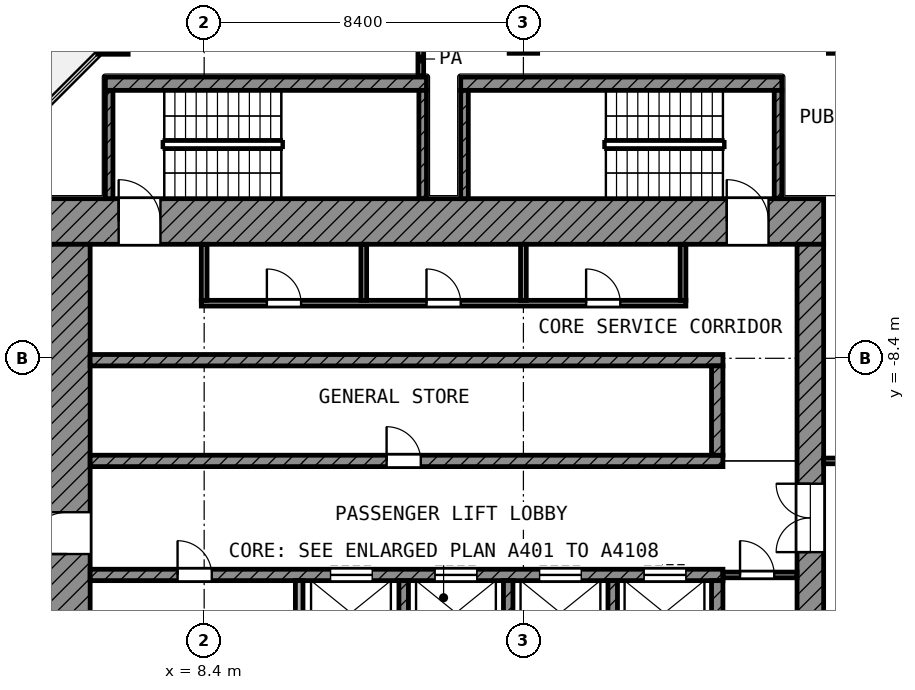
"""IFC4 building model, lengths in metres.
Left out: names, types, materials, properties, quantities, classifications, styles, units other than length and angle.
Written with IfcOpenShell. Run it as: python <this file> out.ifc"""

import sys

from ifc_helpers import new_model, si_unit, direction, frame, frame_2d, origin, origin_2d, place, context, subcontext, project, spatial, rectangle, extrude, element, fill, save


model = new_model("IFC4")
c1 = context("Model", 3, precision=1e-05, world=origin(), true_north=direction((0.0, 1.0)))
c2 = subcontext(c1, "Body", "Model", "MODEL_VIEW")
j1 = project(units=[si_unit("LENGTHUNIT", "METRE"), si_unit("PLANEANGLEUNIT", "RADIAN")], contexts=[c1])
p1 = place(None, origin())
s1 = spatial("IfcSite", under=j1, at=p1, CompositionType="ELEMENT")
p2 = place(p1, origin())
s2 = spatial("IfcBuilding", under=s1, at=p2, CompositionType="ELEMENT")
p3 = place(p2, frame((0.0, 0.0, 315.4)))
s3 = spatial("IfcBuildingStorey", under=s2, at=p3, CompositionType="ELEMENT", Elevation=315.4)
p4 = place(p3, frame((6.0, 0.0, 0.0), z_axis=(0.0, 0.0, 1.0), x_axis=(1.0, 0.0, 0.0)))
e1 = element("IfcColumn", 1, at=p4, inside=s3, PredefinedType="COLUMN", context=c2, shape_type="SweptSolid", body=[
    extrude(rectangle(XDim=0.8, YDim=0.8, at=origin_2d()), origin(), (0.0, 0.0, 1.0), 4.2),
])
for number, where, z_axis, x_axis in (
    (2, (16.8, 0.0, 0.0), (0.0, 0.0, 1.0), (1.0, 0.0, 0.0)),
    (3, (25.2, 0.0, 0.0), (0.0, 0.0, 1.0), (1.0, 0.0, 0.0)),
):
    element("IfcColumn", number, at=place(p3, frame(where, z_axis=z_axis, x_axis=x_axis)), inside=s3, PredefinedType="COLUMN", context=c2, shape_type="SweptSolid", body=[
        extrude(rectangle(XDim=0.75, YDim=0.75, at=origin_2d()), origin(), (0.0, 0.0, 1.0), 4.2),
    ])
p5 = place(p3, frame((4.2, -4.8, 0.0), z_axis=(0.0, 0.0, 1.0), x_axis=(1.0, 0.0, 0.0)))
e4 = element("IfcWall", 4, at=p5, inside=s3, PredefinedType="SHEAR", context=c2, shape_type="SweptSolid", body=[
    extrude(rectangle(XDim=20.5, YDim=1.2, at=frame_2d((10.25, 0.0))), origin(), (0.0, 0.0, 1.0), 3.6),
])
p6 = place(p5, frame((1.95, 0.0, 0.0)))
e5 = element("IfcOpeningElement", 5, at=p6, cuts=e4, PredefinedType="OPENING", context=c2, shape_type="SweptSolid", body=[
    extrude(rectangle(XDim=1.1, YDim=2.1, at=frame_2d((0.55, 1.05))), frame((0.0, 0.61, 0.0), z_axis=(0.0, -1.0, 0.0), x_axis=(1.0, 0.0, 0.0)), (0.0, 0.0, 1.0), 1.22),
])
p7 = place(p5, frame((17.95, 0.0, 0.0)))
e6 = element("IfcOpeningElement", 6, at=p7, cuts=e4, PredefinedType="OPENING", context=c2, shape_type="SweptSolid", body=[
    extrude(rectangle(XDim=1.1, YDim=2.1, at=frame_2d((0.55, 1.05))), frame((0.0, 0.61, 0.0), z_axis=(0.0, -1.0, 0.0), x_axis=(1.0, 0.0, 0.0)), (0.0, 0.0, 1.0), 1.22),
])
p8 = place(p3, frame((4.8, -24.7, 0.0), z_axis=(0.0, 0.0, 1.0), x_axis=(0.0, 1.0, 0.0)))
e7 = element("IfcWall", 7, at=p8, inside=s3, PredefinedType="SHEAR", context=c2, shape_type="SweptSolid", body=[
    extrude(rectangle(XDim=19.3, YDim=1.2, at=frame_2d((9.65, 0.0))), origin(), (0.0, 0.0, 1.0), 3.6),
])
p9 = place(p8, frame((11.15, 0.0, 0.0)))
e8 = element("IfcOpeningElement", 8, at=p9, cuts=e7, PredefinedType="OPENING", context=c2, shape_type="SweptSolid", body=[
    extrude(rectangle(XDim=1.1, YDim=2.1, at=frame_2d((0.55, 1.05))), frame((0.0, 0.61, 0.0), z_axis=(0.0, -1.0, 0.0), x_axis=(1.0, 0.0, 0.0)), (0.0, 0.0, 1.0), 1.22),
])
p10 = place(p8, frame((1.85, 0.0, 0.0)))
e9 = element("IfcOpeningElement", 9, at=p10, cuts=e7, PredefinedType="OPENING", context=c2, shape_type="SweptSolid", body=[
    extrude(rectangle(XDim=1.1, YDim=2.1, at=frame_2d((0.55, 1.05))), frame((0.0, 0.61, 0.0), z_axis=(0.0, -1.0, 0.0), x_axis=(1.0, 0.0, 0.0)), (0.0, 0.0, 1.0), 1.22),
])
p11 = place(p3, frame((24.35, -24.0, 0.0), z_axis=(0.0, 0.0, 1.0), x_axis=(0.0, 1.0, 0.0)))
e10 = element("IfcWall", 10, at=p11, inside=s3, PredefinedType="SHEAR", context=c2, shape_type="SweptSolid", body=[
    extrude(rectangle(XDim=18.6, YDim=0.7, at=frame_2d((9.3, 0.0))), origin(), (0.0, 0.0, 1.0), 3.6),
])
p12 = place(p11, frame((10.5, 0.0, 0.0)))
e11 = element("IfcOpeningElement", 11, at=p12, cuts=e10, PredefinedType="OPENING", context=c2, shape_type="SweptSolid", body=[
    extrude(rectangle(XDim=1.8, YDim=2.1, at=frame_2d((0.9, 1.05))), frame((0.0, 0.36, 0.0), z_axis=(0.0, -1.0, 0.0), x_axis=(1.0, 0.0, 0.0)), (0.0, 0.0, 1.0), 0.72),
])
p13 = place(p3, frame((5.4, -8.45, 0.0), z_axis=(0.0, 0.0, 1.0), x_axis=(1.0, 0.0, 0.0)))
e12 = element("IfcWall", 12, at=p13, inside=s3, PredefinedType="SHEAR", context=c2, shape_type="SweptSolid", body=[
    extrude(rectangle(XDim=16.65, YDim=0.3, at=frame_2d((8.325, 0.0))), origin(), (0.0, 0.0, 1.0), 3.6),
])
p14 = place(p3, frame((5.4, -11.1, 0.0), z_axis=(0.0, 0.0, 1.0), x_axis=(1.0, 0.0, 0.0)))
e13 = element("IfcWall", 13, at=p14, inside=s3, PredefinedType="SHEAR", context=c2, shape_type="SweptSolid", body=[
    extrude(rectangle(XDim=16.65, YDim=0.3, at=frame_2d((8.325, 0.0))), origin(), (0.0, 0.0, 1.0), 3.6),
])
p15 = place(p14, frame((7.8, 0.0, 0.0)))
e14 = element("IfcOpeningElement", 14, at=p15, cuts=e13, PredefinedType="OPENING", context=c2, shape_type="SweptSolid", body=[
    extrude(rectangle(XDim=0.9, YDim=2.1, at=frame_2d((0.45, 1.05))), frame((0.0, 0.16, 0.0), z_axis=(0.0, -1.0, 0.0), x_axis=(1.0, 0.0, 0.0)), (0.0, 0.0, 1.0), 0.32),
])
p16 = place(p3, frame((5.4, -14.1, 0.0), z_axis=(0.0, 0.0, 1.0), x_axis=(1.0, 0.0, 0.0)))
e15 = element("IfcWall", 15, at=p16, inside=s3, PredefinedType="SHEAR", context=c2, shape_type="SweptSolid", body=[
    extrude(rectangle(XDim=16.65, YDim=0.3, at=frame_2d((8.325, 0.0))), origin(), (0.0, 0.0, 1.0), 3.6),
])
p17 = place(p16, frame((6.325, 0.0, 0.0)))
e16 = element("IfcOpeningElement", 16, at=p17, cuts=e15, PredefinedType="OPENING", context=c2, shape_type="SweptSolid", body=[
    extrude(rectangle(XDim=1.1, YDim=2.1, at=frame_2d((0.55, 1.05))), frame((0.0, 0.16, 0.0), z_axis=(0.0, -1.0, 0.0), x_axis=(1.0, 0.0, 0.0)), (0.0, 0.0, 1.0), 0.32),
])
p18 = place(p16, frame((9.075, 0.0, 0.0)))
e17 = element("IfcOpeningElement", 17, at=p18, cuts=e15, PredefinedType="OPENING", context=c2, shape_type="SweptSolid", body=[
    extrude(rectangle(XDim=1.1, YDim=2.1, at=frame_2d((0.55, 1.05))), frame((0.0, 0.16, 0.0), z_axis=(0.0, -1.0, 0.0), x_axis=(1.0, 0.0, 0.0)), (0.0, 0.0, 1.0), 0.32),
])
p19 = place(p16, frame((11.825, 0.0, 0.0)))
e18 = element("IfcOpeningElement", 18, at=p19, cuts=e15, PredefinedType="OPENING", context=c2, shape_type="SweptSolid", body=[
    extrude(rectangle(XDim=1.1, YDim=2.1, at=frame_2d((0.55, 1.05))), frame((0.0, 0.16, 0.0), z_axis=(0.0, -1.0, 0.0), x_axis=(1.0, 0.0, 0.0)), (0.0, 0.0, 1.0), 0.32),
])
p20 = place(p16, frame((14.575, 0.0, 0.0)))
e19 = element("IfcOpeningElement", 19, at=p20, cuts=e15, PredefinedType="OPENING", context=c2, shape_type="SweptSolid", body=[
    extrude(rectangle(XDim=1.1, YDim=2.1, at=frame_2d((0.55, 1.05))), frame((0.0, 0.16, 0.0), z_axis=(0.0, -1.0, 0.0), x_axis=(1.0, 0.0, 0.0)), (0.0, 0.0, 1.0), 0.32),
])
p21 = place(p16, frame((2.3, 0.0, 0.0)))
e20 = element("IfcOpeningElement", 20, at=p21, cuts=e15, PredefinedType="OPENING", context=c2, shape_type="SweptSolid", body=[
    extrude(rectangle(XDim=0.9, YDim=2.1, at=frame_2d((0.45, 1.05))), frame((0.0, 0.16, 0.0), z_axis=(0.0, -1.0, 0.0), x_axis=(1.0, 0.0, 0.0)), (0.0, 0.0, 1.0), 0.32),
])
p22 = place(p3, frame((21.9, -10.95, 0.0), z_axis=(0.0, 0.0, 1.0), x_axis=(0.0, 1.0, 0.0)))
e21 = element("IfcWall", 21, at=p22, inside=s3, PredefinedType="SHEAR", context=c2, shape_type="SweptSolid", body=[
    extrude(rectangle(XDim=2.35, YDim=0.3, at=frame_2d((1.175, 0.0))), origin(), (0.0, 0.0, 1.0), 3.6),
])
p23 = place(p3, frame((21.9, -16.6, 0.0), z_axis=(0.0, 0.0, 1.0), x_axis=(0.0, 1.0, 0.0)))
e22 = element("IfcWall", 22, at=p23, inside=s3, PredefinedType="SHEAR", context=c2, shape_type="SweptSolid", body=[
    extrude(rectangle(XDim=2.35, YDim=0.3, at=frame_2d((1.175, 0.0))), origin(), (0.0, 0.0, 1.0), 3.6),
])
p24 = place(p3, frame((10.9, -16.6, 0.0), z_axis=(0.0, 0.0, 1.0), x_axis=(0.0, 1.0, 0.0)))
e23 = element("IfcWall", 23, at=p24, inside=s3, PredefinedType="PARTITIONING", context=c2, shape_type="SweptSolid", body=[
    extrude(rectangle(XDim=2.35, YDim=0.2, at=frame_2d((1.175, 0.0))), origin(), (0.0, 0.0, 1.0), 3.6),
])
for number, where, z_axis, x_axis in (
    (24, (13.65, -16.6, 0.0), (0.0, 0.0, 1.0), (0.0, 1.0, 0.0)),
    (25, (16.4, -16.6, 0.0), (0.0, 0.0, 1.0), (0.0, 1.0, 0.0)),
    (26, (19.15, -16.6, 0.0), (0.0, 0.0, 1.0), (0.0, 1.0, 0.0)),
):
    element("IfcWall", number, at=place(p3, frame(where, z_axis=z_axis, x_axis=x_axis)), inside=s3, PredefinedType="SHEAR", context=c2, shape_type="SweptSolid", body=[
        extrude(rectangle(XDim=2.35, YDim=0.25, at=frame_2d((1.175, 0.0))), origin(), (0.0, 0.0, 1.0), 3.6),
    ])
p25 = place(p3, frame((22.05, -14.1, 0.0), z_axis=(0.0, 0.0, 1.0), x_axis=(1.0, 0.0, 0.0)))
e27 = element("IfcWall", 27, at=p25, inside=s3, PredefinedType="PARTITIONING", context=c2, shape_type="SweptSolid", body=[
    extrude(rectangle(XDim=1.95, YDim=0.15, at=frame_2d((0.975, 0.0))), origin(), (0.0, 0.0, 1.0), 3.6),
])
p26 = place(p25, frame((0.45, 0.0, 0.0)))
e28 = element("IfcOpeningElement", 28, at=p26, cuts=e27, PredefinedType="OPENING", context=c2, shape_type="SweptSolid", body=[
    extrude(rectangle(XDim=0.9, YDim=2.1, at=frame_2d((0.45, 1.05))), frame((0.0, 0.085, 0.0), z_axis=(0.0, -1.0, 0.0), x_axis=(1.0, 0.0, 0.0)), (0.0, 0.0, 1.0), 0.17),
])
p27 = place(p3, frame((8.325, -6.95, 0.0), z_axis=(0.0, 0.0, 1.0), x_axis=(1.0, 0.0, 0.0)))
e29 = element("IfcWall", 29, at=p27, inside=s3, PredefinedType="PARTITIONING", context=c2, shape_type="SweptSolid", body=[
    extrude(rectangle(XDim=12.75, YDim=0.15, at=frame_2d((6.375, 0.0))), origin(), (0.0, 0.0, 1.0), 3.6),
])
p28 = place(p27, frame((1.725, 0.0, 0.0)))
e30 = element("IfcOpeningElement", 30, at=p28, cuts=e29, PredefinedType="OPENING", context=c2, shape_type="SweptSolid", body=[
    extrude(rectangle(XDim=0.9, YDim=2.1, at=frame_2d((0.45, 1.05))), frame((0.0, 0.085, 0.0), z_axis=(0.0, -1.0, 0.0), x_axis=(1.0, 0.0, 0.0)), (0.0, 0.0, 1.0), 0.17),
])
p29 = place(p27, frame((5.925, 0.0, 0.0)))
e31 = element("IfcOpeningElement", 31, at=p29, cuts=e29, PredefinedType="OPENING", context=c2, shape_type="SweptSolid", body=[
    extrude(rectangle(XDim=0.9, YDim=2.1, at=frame_2d((0.45, 1.05))), frame((0.0, 0.085, 0.0), z_axis=(0.0, -1.0, 0.0), x_axis=(1.0, 0.0, 0.0)), (0.0, 0.0, 1.0), 0.17),
])
p30 = place(p27, frame((10.125, 0.0, 0.0)))
e32 = element("IfcOpeningElement", 32, at=p30, cuts=e29, PredefinedType="OPENING", context=c2, shape_type="SweptSolid", body=[
    extrude(rectangle(XDim=0.9, YDim=2.1, at=frame_2d((0.45, 1.05))), frame((0.0, 0.085, 0.0), z_axis=(0.0, -1.0, 0.0), x_axis=(1.0, 0.0, 0.0)), (0.0, 0.0, 1.0), 0.17),
])
for number, where, z_axis, x_axis in (
    (33, (8.4, -6.875, 0.0), (0.0, 0.0, 1.0), (0.0, 1.0, 0.0)),
    (34, (12.6, -6.875, 0.0), (0.0, 0.0, 1.0), (0.0, 1.0, 0.0)),
    (35, (16.8, -6.875, 0.0), (0.0, 0.0, 1.0), (0.0, 1.0, 0.0)),
    (36, (21.0, -6.875, 0.0), (0.0, 0.0, 1.0), (0.0, 1.0, 0.0)),
):
    element("IfcWall", number, at=place(p3, frame(where, z_axis=z_axis, x_axis=x_axis)), inside=s3, PredefinedType="PARTITIONING", context=c2, shape_type="SweptSolid", body=[
        extrude(rectangle(XDim=1.475, YDim=0.15, at=frame_2d((0.738, 0.0))), origin(), (0.0, 0.0, 1.0), 3.6),
    ])
p31 = place(p3, frame((5.8, -1.175, 0.0), z_axis=(0.0, 0.0, 1.0), x_axis=(1.0, 0.0, 0.0)))
e37 = element("IfcWall", 37, at=p31, inside=s3, PredefinedType="SHEAR", context=c2, shape_type="SweptSolid", body=[
    extrude(rectangle(XDim=8.45, YDim=0.35, at=frame_2d((4.225, 0.0))), origin(), (0.0, 0.0, 1.0), 3.6),
])
for number, where, z_axis, x_axis in (
    (38, (5.9, -4.2, 0.0), (0.0, 0.0, 1.0), (0.0, 1.0, 0.0)),
    (39, (14.15, -4.2, 0.0), (0.0, 0.0, 1.0), (0.0, 1.0, 0.0)),
):
    element("IfcWall", number, at=place(p3, frame(where, z_axis=z_axis, x_axis=x_axis)), inside=s3, PredefinedType="SHEAR", context=c2, shape_type="SweptSolid", body=[
        extrude(rectangle(XDim=2.85, YDim=0.2, at=frame_2d((1.425, 0.0))), origin(), (0.0, 0.0, 1.0), 3.6),
    ])
p32 = place(p3, frame((15.15, -1.175, 0.0), z_axis=(0.0, 0.0, 1.0), x_axis=(1.0, 0.0, 0.0)))
e40 = element("IfcWall", 40, at=p32, inside=s3, PredefinedType="SHEAR", context=c2, shape_type="SweptSolid", body=[
    extrude(rectangle(XDim=8.45, YDim=0.35, at=frame_2d((4.225, 0.0))), origin(), (0.0, 0.0, 1.0), 3.6),
])
for number, where, z_axis, x_axis in (
    (41, (15.25, -4.2, 0.0), (0.0, 0.0, 1.0), (0.0, 1.0, 0.0)),
    (42, (23.5, -4.2, 0.0), (0.0, 0.0, 1.0), (0.0, 1.0, 0.0)),
):
    element("IfcWall", number, at=place(p3, frame(where, z_axis=z_axis, x_axis=x_axis)), inside=s3, PredefinedType="SHEAR", context=c2, shape_type="SweptSolid", body=[
        extrude(rectangle(XDim=2.85, YDim=0.2, at=frame_2d((1.425, 0.0))), origin(), (0.0, 0.0, 1.0), 3.6),
    ])
p33 = place(p3, frame((24.7, -11.1, 0.0), z_axis=(0.0, 0.0, 1.0), x_axis=(1.0, 0.0, 0.0)))
e43 = element("IfcWall", 43, at=p33, inside=s3, PredefinedType="PARTITIONING", context=c2, shape_type="SweptSolid", body=[
    extrude(rectangle(XDim=4.625, YDim=0.15, at=frame_2d((2.312, 0.0))), origin(), (0.0, 0.0, 1.0), 3.6),
])
p34 = place(p33, frame((1.1, 0.0, 0.0)))
e44 = element("IfcOpeningElement", 44, at=p34, cuts=e43, PredefinedType="OPENING", context=c2, shape_type="SweptSolid", body=[
    extrude(rectangle(XDim=0.9, YDim=2.1, at=frame_2d((0.45, 1.05))), frame((0.0, 0.085, 0.0), z_axis=(0.0, -1.0, 0.0), x_axis=(1.0, 0.0, 0.0)), (0.0, 0.0, 1.0), 0.17),
])
p35 = place(p33, frame((3.15, 0.0, 0.0)))
e45 = element("IfcOpeningElement", 45, at=p35, cuts=e43, PredefinedType="OPENING", context=c2, shape_type="SweptSolid", body=[
    extrude(rectangle(XDim=1.0, YDim=2.1, at=frame_2d((0.5, 1.05))), frame((0.0, 0.085, 0.0), z_axis=(0.0, -1.0, 0.0), x_axis=(1.0, 0.0, 0.0)), (0.0, 0.0, 1.0), 0.17),
])
p36 = place(p3, frame((14.1, -0.97, 0.0), z_axis=(0.0, 0.0, 1.0), x_axis=(0.0, 1.0, 0.0)))
e46 = element("IfcWall", 46, at=p36, inside=s3, PredefinedType="PARTITIONING", context=c2, shape_type="SweptSolid", body=[
    extrude(rectangle(XDim=0.89, YDim=0.15, at=frame_2d((0.445, 0.0))), origin(), (0.0, 0.0, 1.0), 3.6),
])
p37 = place(p17, origin())
e47 = element("IfcDoor", 47, at=p37, inside=s3, OperationType="DOUBLE_DOOR_SLIDING", PredefinedType="DOOR", context=c2, shape_type="SweptSolid", body=[
    extrude(rectangle(XDim=1.1, YDim=2.1, at=frame_2d((0.55, 1.05))), frame((0.0, 0.025, 0.0), z_axis=(0.0, -1.0, 0.0), x_axis=(1.0, 0.0, 0.0)), (0.0, 0.0, 1.0), 0.05),
])
fill(e16, e47)
p38 = place(p18, origin())
e48 = element("IfcDoor", 48, at=p38, inside=s3, OperationType="DOUBLE_DOOR_SLIDING", PredefinedType="DOOR", context=c2, shape_type="SweptSolid", body=[
    extrude(rectangle(XDim=1.1, YDim=2.1, at=frame_2d((0.55, 1.05))), frame((0.0, 0.025, 0.0), z_axis=(0.0, -1.0, 0.0), x_axis=(1.0, 0.0, 0.0)), (0.0, 0.0, 1.0), 0.05),
])
fill(e17, e48)
p39 = place(p19, origin())
e49 = element("IfcDoor", 49, at=p39, inside=s3, OperationType="DOUBLE_DOOR_SLIDING", PredefinedType="DOOR", context=c2, shape_type="SweptSolid", body=[
    extrude(rectangle(XDim=1.1, YDim=2.1, at=frame_2d((0.55, 1.05))), frame((0.0, 0.025, 0.0), z_axis=(0.0, -1.0, 0.0), x_axis=(1.0, 0.0, 0.0)), (0.0, 0.0, 1.0), 0.05),
])
fill(e18, e49)
p40 = place(p20, origin())
e50 = element("IfcDoor", 50, at=p40, inside=s3, OperationType="DOUBLE_DOOR_SLIDING", PredefinedType="DOOR", context=c2, shape_type="SweptSolid", body=[
    extrude(rectangle(XDim=1.1, YDim=2.1, at=frame_2d((0.55, 1.05))), frame((0.0, 0.025, 0.0), z_axis=(0.0, -1.0, 0.0), x_axis=(1.0, 0.0, 0.0)), (0.0, 0.0, 1.0), 0.05),
])
fill(e19, e50)
p41 = place(p9, origin())
e51 = element("IfcDoor", 51, at=p41, inside=s3, OperationType="SINGLE_SWING_LEFT", PredefinedType="DOOR", context=c2, shape_type="SweptSolid", body=[
    extrude(rectangle(XDim=1.1, YDim=2.1, at=frame_2d((0.55, 1.05))), frame((0.0, 0.025, 0.0), z_axis=(0.0, -1.0, 0.0), x_axis=(1.0, 0.0, 0.0)), (0.0, 0.0, 1.0), 0.05),
])
fill(e8, e51)
p42 = place(p6, origin())
e52 = element("IfcDoor", 52, at=p42, inside=s3, OperationType="SINGLE_SWING_LEFT", PredefinedType="DOOR", context=c2, shape_type="SweptSolid", body=[
    extrude(rectangle(XDim=1.1, YDim=2.1, at=frame_2d((0.55, 1.05))), frame((0.0, 0.025, 0.0), z_axis=(0.0, -1.0, 0.0), x_axis=(1.0, 0.0, 0.0)), (0.0, 0.0, 1.0), 0.05),
])
fill(e5, e52)
p43 = place(p7, origin())
e53 = element("IfcDoor", 53, at=p43, inside=s3, OperationType="SINGLE_SWING_LEFT", PredefinedType="DOOR", context=c2, shape_type="SweptSolid", body=[
    extrude(rectangle(XDim=1.1, YDim=2.1, at=frame_2d((0.55, 1.05))), frame((0.0, 0.025, 0.0), z_axis=(0.0, -1.0, 0.0), x_axis=(1.0, 0.0, 0.0)), (0.0, 0.0, 1.0), 0.05),
])
fill(e6, e53)
p44 = place(p12, origin())
e54 = element("IfcDoor", 54, at=p44, inside=s3, OperationType="DOUBLE_DOOR_SINGLE_SWING", PredefinedType="DOOR", context=c2, shape_type="SweptSolid", body=[
    extrude(rectangle(XDim=1.8, YDim=2.1, at=frame_2d((0.9, 1.05))), frame((0.0, 0.025, 0.0), z_axis=(0.0, -1.0, 0.0), x_axis=(1.0, 0.0, 0.0)), (0.0, 0.0, 1.0), 0.05),
])
fill(e11, e54)
p45 = place(p28, origin())
e55 = element("IfcDoor", 55, at=p45, inside=s3, OperationType="SINGLE_SWING_LEFT", PredefinedType="DOOR", context=c2, shape_type="SweptSolid", body=[
    extrude(rectangle(XDim=0.9, YDim=2.1, at=frame_2d((0.45, 1.05))), frame((0.0, 0.025, 0.0), z_axis=(0.0, -1.0, 0.0), x_axis=(1.0, 0.0, 0.0)), (0.0, 0.0, 1.0), 0.05),
])
fill(e30, e55)
p46 = place(p29, origin())
e56 = element("IfcDoor", 56, at=p46, inside=s3, OperationType="SINGLE_SWING_LEFT", PredefinedType="DOOR", context=c2, shape_type="SweptSolid", body=[
    extrude(rectangle(XDim=0.9, YDim=2.1, at=frame_2d((0.45, 1.05))), frame((0.0, 0.025, 0.0), z_axis=(0.0, -1.0, 0.0), x_axis=(1.0, 0.0, 0.0)), (0.0, 0.0, 1.0), 0.05),
])
fill(e31, e56)
p47 = place(p30, origin())
e57 = element("IfcDoor", 57, at=p47, inside=s3, OperationType="SINGLE_SWING_LEFT", PredefinedType="DOOR", context=c2, shape_type="SweptSolid", body=[
    extrude(rectangle(XDim=0.9, YDim=2.1, at=frame_2d((0.45, 1.05))), frame((0.0, 0.025, 0.0), z_axis=(0.0, -1.0, 0.0), x_axis=(1.0, 0.0, 0.0)), (0.0, 0.0, 1.0), 0.05),
])
fill(e32, e57)
p48 = place(p26, origin())
e58 = element("IfcDoor", 58, at=p48, inside=s3, OperationType="SINGLE_SWING_LEFT", PredefinedType="DOOR", context=c2, shape_type="SweptSolid", body=[
    extrude(rectangle(XDim=0.9, YDim=2.1, at=frame_2d((0.45, 1.05))), frame((0.0, 0.025, 0.0), z_axis=(0.0, -1.0, 0.0), x_axis=(1.0, 0.0, 0.0)), (0.0, 0.0, 1.0), 0.05),
])
fill(e28, e58)
p49 = place(p15, origin())
e59 = element("IfcDoor", 59, at=p49, inside=s3, OperationType="SINGLE_SWING_LEFT", PredefinedType="DOOR", context=c2, shape_type="SweptSolid", body=[
    extrude(rectangle(XDim=0.9, YDim=2.1, at=frame_2d((0.45, 1.05))), frame((0.0, 0.025, 0.0), z_axis=(0.0, -1.0, 0.0), x_axis=(1.0, 0.0, 0.0)), (0.0, 0.0, 1.0), 0.05),
])
fill(e14, e59)
p50 = place(p21, origin())
e60 = element("IfcDoor", 60, at=p50, inside=s3, OperationType="SINGLE_SWING_LEFT", PredefinedType="DOOR", context=c2, shape_type="SweptSolid", body=[
    extrude(rectangle(XDim=0.9, YDim=2.1, at=frame_2d((0.45, 1.05))), frame((0.0, 0.025, 0.0), z_axis=(0.0, -1.0, 0.0), x_axis=(1.0, 0.0, 0.0)), (0.0, 0.0, 1.0), 0.05),
])
fill(e20, e60)
save(model, sys.argv[1])
